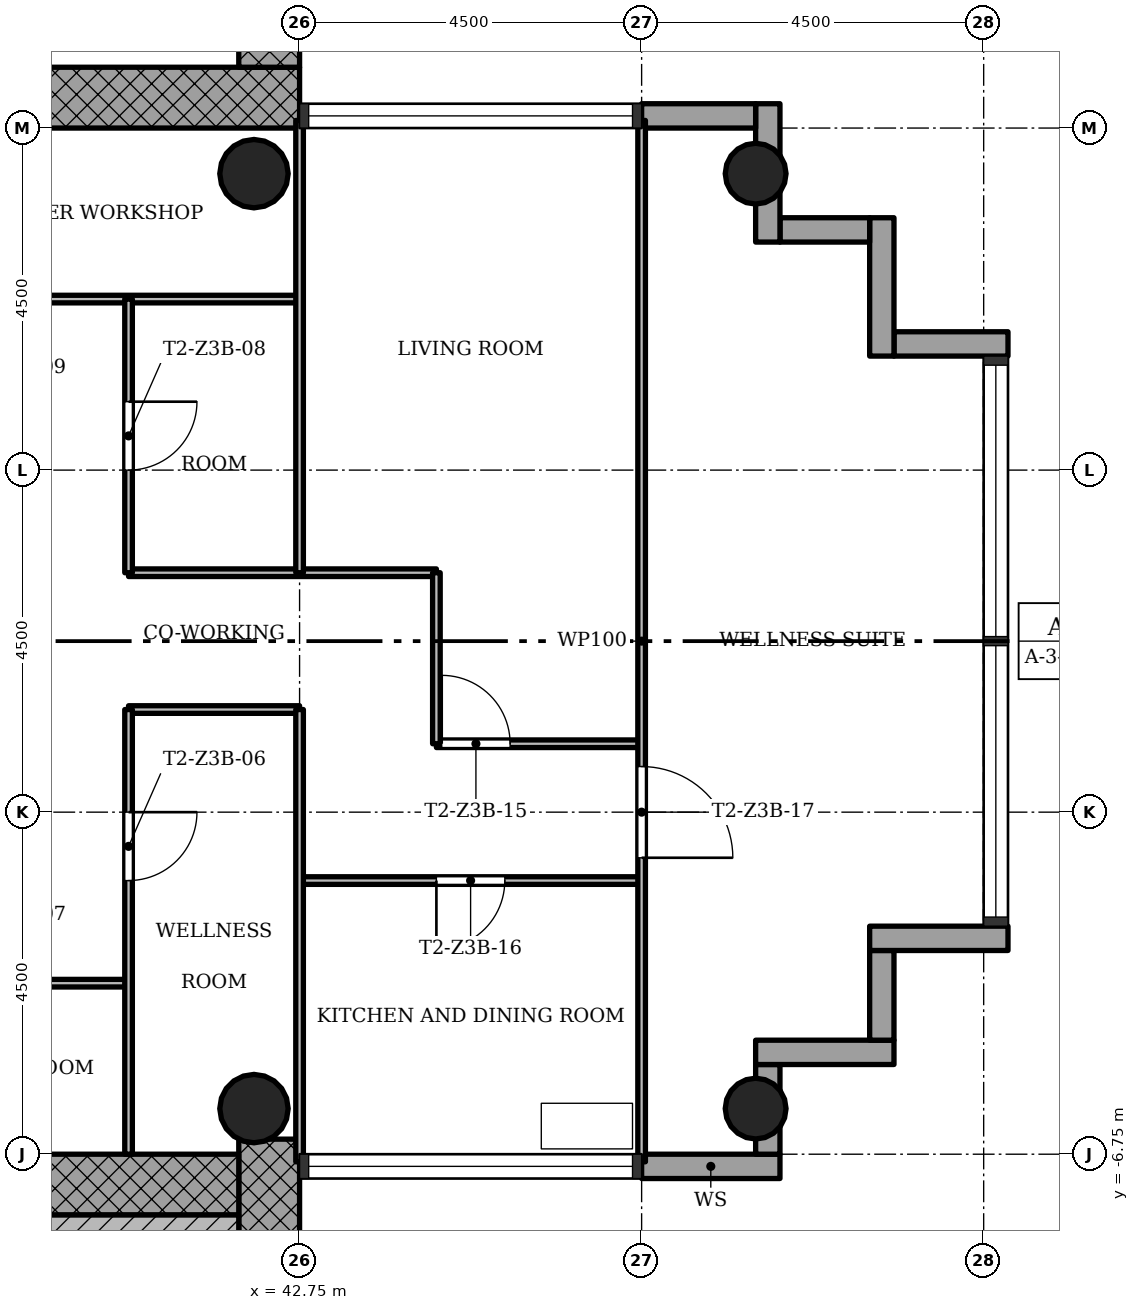
"""IFC4 building model, lengths in metres.
Left out: names, types, materials, properties, quantities, classifications, styles, units other than length and angle.
Written with IfcOpenShell. Run it as: python <this file> out.ifc"""

import sys

from ifc_helpers import new_model, si_unit, direction, frame, frame_2d, origin, origin_2d, place, context, subcontext, project, spatial, rectangle, hollow_circle, extrude, element, fill, save


model = new_model("IFC4")
c1 = context("Model", 3, precision=1e-05, world=origin(), true_north=direction((0.0, 1.0)))
c2 = subcontext(c1, "Body", "Model", "MODEL_VIEW")
j1 = project(units=[si_unit("LENGTHUNIT", "METRE"), si_unit("PLANEANGLEUNIT", "RADIAN")], contexts=[c1])
p1 = place(None, origin())
s1 = spatial("IfcSite", under=j1, at=p1, CompositionType="ELEMENT")
p2 = place(p1, origin())
s2 = spatial("IfcBuilding", under=s1, at=p2, CompositionType="ELEMENT")
p3 = place(p2, frame((0.0, 0.0, 147.3)))
s3 = spatial("IfcBuildingStorey", under=s2, at=p3, CompositionType="ELEMENT", Elevation=147.3)
p4 = place(p3, frame((30.05, 7.15, 0.0), z_axis=(0.0, 0.0, 1.0), x_axis=(1.0, 0.0, 0.0)))
e1 = element("IfcWall", 1, at=p4, inside=s3, PredefinedType="SHEAR", context=c2, shape_type="SweptSolid", body=[
    extrude(rectangle(XDim=12.7, YDim=0.8, at=frame_2d((6.35, 0.0))), origin(), (0.0, 0.0, 1.0), 3.4),
])
p5 = place(p4, frame((5.05, 0.0, 0.0)))
e2 = element("IfcOpeningElement", 2, at=p5, cuts=e1, PredefinedType="OPENING", context=c2, shape_type="SweptSolid", body=[
    extrude(rectangle(XDim=1.8, YDim=2.1, at=frame_2d((0.9, 1.05))), frame((0.0, 0.41, 0.0), z_axis=(0.0, -1.0, 0.0), x_axis=(1.0, 0.0, 0.0)), (0.0, 0.0, 1.0), 0.82),
])
p6 = place(p3, frame((42.35, 7.55, 0.0), z_axis=(0.0, 0.0, 1.0), x_axis=(0.0, 1.0, 0.0)))
e3 = element("IfcWall", 3, at=p6, inside=s3, PredefinedType="SHEAR", context=c2, shape_type="SweptSolid", body=[
    extrude(rectangle(XDim=8.2, YDim=0.8, at=frame_2d((4.1, 0.0))), origin(), (0.0, 0.0, 1.0), 3.4),
])
p7 = place(p3, frame((42.35, -14.95, 0.0), z_axis=(0.0, 0.0, 1.0), x_axis=(0.0, 1.0, 0.0)))
e4 = element("IfcWall", 4, at=p7, inside=s3, PredefinedType="SHEAR", context=c2, shape_type="SweptSolid", body=[
    extrude(rectangle(XDim=8.398, YDim=0.8, at=frame_2d((4.199, 0.0))), origin(), (0.0, 0.0, 1.0), 3.4),
])
p8 = place(p3, frame((41.95, -7.15, 0.0), z_axis=(0.0, 0.0, 1.0), x_axis=(-1.0, 0.0, 0.0)))
e5 = element("IfcWall", 5, at=p8, inside=s3, PredefinedType="SHEAR", context=c2, shape_type="SweptSolid", body=[
    extrude(rectangle(XDim=12.7, YDim=0.8, at=frame_2d((6.35, 0.0))), origin(), (0.0, 0.0, 1.0), 3.4),
])
p9 = place(p8, frame((5.05, 0.0, 0.0)))
e6 = element("IfcOpeningElement", 6, at=p9, cuts=e5, PredefinedType="OPENING", context=c2, shape_type="SweptSolid", body=[
    extrude(rectangle(XDim=1.8, YDim=2.1, at=frame_2d((0.9, 1.05))), frame((0.0, 0.41, 0.0), z_axis=(0.0, -1.0, 0.0), x_axis=(1.0, 0.0, 0.0)), (0.0, 0.0, 1.0), 0.82),
])
for number, where, z_axis, x_axis in (
    (7, (48.75, -6.15, 0.0), (0.0, 0.0, 1.0), (1.0, 0.0, 0.0)),
    (8, (48.75, 6.15, 0.0), (0.0, 0.0, 1.0), (1.0, 0.0, 0.0)),
):
    element("IfcColumn", number, at=place(p3, frame(where, z_axis=z_axis, x_axis=x_axis)), inside=s3, PredefinedType="COLUMN", context=c2, shape_type="SweptSolid", body=[
        extrude(hollow_circle(Radius=0.4, WallThickness=0.028, at=origin_2d()), origin(), (0.0, 0.0, 1.0), 3.4),
    ])
for number, where, z_axis, x_axis in (
    (9, (42.15, -6.15, 0.0), (0.0, 0.0, 1.0), (1.0, 0.0, 0.0)),
    (10, (42.15, 6.15, 0.0), (0.0, 0.0, 1.0), (1.0, 0.0, 0.0)),
):
    element("IfcColumn", number, at=place(p3, frame(where, z_axis=z_axis, x_axis=x_axis)), inside=s3, PredefinedType="COLUMN", context=c2, shape_type="SweptSolid", body=[
        extrude(hollow_circle(Radius=0.45, WallThickness=0.032, at=origin_2d()), origin(), (0.0, 0.0, 1.0), 3.4),
    ])
p10 = place(p3, frame((47.25, -6.91, -0.3), z_axis=(0.0, 0.0, 1.0), x_axis=(1.0, 0.0, 0.0)))
e11 = element("IfcWall", 11, at=p10, inside=s3, PredefinedType="STANDARD", context=c2, shape_type="SweptSolid", body=[
    extrude(rectangle(XDim=1.82, YDim=0.32, at=frame_2d((0.91, 0.0))), origin(), (0.0, 0.0, 1.0), 3.4),
])
p11 = place(p3, frame((48.91, -6.75, -0.3), z_axis=(0.0, 0.0, 1.0), x_axis=(0.0, 1.0, 0.0)))
e12 = element("IfcWall", 12, at=p11, inside=s3, PredefinedType="STANDARD", context=c2, shape_type="SweptSolid", body=[
    extrude(rectangle(XDim=1.18, YDim=0.32, at=frame_2d((0.59, 0.0))), origin(), (0.0, 0.0, 1.0), 3.4),
])
p12 = place(p3, frame((48.75, -5.41, -0.3), z_axis=(0.0, 0.0, 1.0), x_axis=(1.0, 0.0, 0.0)))
e13 = element("IfcWall", 13, at=p12, inside=s3, PredefinedType="STANDARD", context=c2, shape_type="SweptSolid", body=[
    extrude(rectangle(XDim=1.82, YDim=0.32, at=frame_2d((0.91, 0.0))), origin(), (0.0, 0.0, 1.0), 3.4),
])
p13 = place(p3, frame((50.41, -5.25, -0.3), z_axis=(0.0, 0.0, 1.0), x_axis=(0.0, 1.0, 0.0)))
e14 = element("IfcWall", 14, at=p13, inside=s3, PredefinedType="STANDARD", context=c2, shape_type="SweptSolid", body=[
    extrude(rectangle(XDim=1.18, YDim=0.32, at=frame_2d((0.59, 0.0))), origin(), (0.0, 0.0, 1.0), 3.4),
])
p14 = place(p3, frame((50.25, -3.91, -0.3), z_axis=(0.0, 0.0, 1.0), x_axis=(1.0, 0.0, 0.0)))
e15 = element("IfcWall", 15, at=p14, inside=s3, PredefinedType="STANDARD", context=c2, shape_type="SweptSolid", body=[
    extrude(rectangle(XDim=1.82, YDim=0.32, at=frame_2d((0.91, 0.0))), origin(), (0.0, 0.0, 1.0), 3.4),
])
p15 = place(p3, frame((52.07, 3.91, -0.3), z_axis=(0.0, 0.0, 1.0), x_axis=(-1.0, 0.0, 0.0)))
e16 = element("IfcWall", 16, at=p15, inside=s3, PredefinedType="STANDARD", context=c2, shape_type="SweptSolid", body=[
    extrude(rectangle(XDim=1.5, YDim=0.32, at=frame_2d((0.75, 0.0))), origin(), (0.0, 0.0, 1.0), 3.4),
])
p16 = place(p3, frame((50.41, 3.75, -0.3), z_axis=(0.0, 0.0, 1.0), x_axis=(0.0, 1.0, 0.0)))
e17 = element("IfcWall", 17, at=p16, inside=s3, PredefinedType="STANDARD", context=c2, shape_type="SweptSolid", body=[
    extrude(rectangle(XDim=1.82, YDim=0.32, at=frame_2d((0.91, 0.0))), origin(), (0.0, 0.0, 1.0), 3.4),
])
p17 = place(p3, frame((50.25, 5.41, -0.3), z_axis=(0.0, 0.0, 1.0), x_axis=(-1.0, 0.0, 0.0)))
e18 = element("IfcWall", 18, at=p17, inside=s3, PredefinedType="STANDARD", context=c2, shape_type="SweptSolid", body=[
    extrude(rectangle(XDim=1.18, YDim=0.32, at=frame_2d((0.59, 0.0))), origin(), (0.0, 0.0, 1.0), 3.4),
])
p18 = place(p3, frame((48.91, 5.25, -0.3), z_axis=(0.0, 0.0, 1.0), x_axis=(0.0, 1.0, 0.0)))
e19 = element("IfcWall", 19, at=p18, inside=s3, PredefinedType="STANDARD", context=c2, shape_type="SweptSolid", body=[
    extrude(rectangle(XDim=1.82, YDim=0.32, at=frame_2d((0.91, 0.0))), origin(), (0.0, 0.0, 1.0), 3.4),
])
p19 = place(p3, frame((48.75, 6.91, -0.3), z_axis=(0.0, 0.0, 1.0), x_axis=(-1.0, 0.0, 0.0)))
e20 = element("IfcWall", 20, at=p19, inside=s3, PredefinedType="STANDARD", context=c2, shape_type="SweptSolid", body=[
    extrude(rectangle(XDim=1.5, YDim=0.32, at=frame_2d((0.75, 0.0))), origin(), (0.0, 0.0, 1.0), 3.4),
])
p20 = place(p3, frame((40.5, -4.5, 0.0), z_axis=(0.0, 0.0, 1.0), x_axis=(-1.0, 0.0, 0.0)))
e21 = element("IfcWall", 21, at=p20, inside=s3, PredefinedType="PARTITIONING", context=c2, shape_type="SweptSolid", body=[
    extrude(rectangle(XDim=3.0, YDim=0.1, at=frame_2d((1.5, 0.0))), origin(), (0.0, 0.0, 1.0), 3.0),
])
p21 = place(p20, frame((1.05, 0.0, 0.0)))
e22 = element("IfcOpeningElement", 22, at=p21, cuts=e21, PredefinedType="OPENING", context=c2, shape_type="SweptSolid", body=[
    extrude(rectangle(XDim=0.9, YDim=2.1, at=frame_2d((0.45, 1.05))), frame((0.0, 0.06, 0.0), z_axis=(0.0, -1.0, 0.0), x_axis=(1.0, 0.0, 0.0)), (0.0, 0.0, 1.0), 0.12),
])
p22 = place(p3, frame((47.25, -3.15, 0.0), z_axis=(0.0, 0.0, 1.0), x_axis=(-1.0, 0.0, 0.0)))
e23 = element("IfcWall", 23, at=p22, inside=s3, PredefinedType="PARTITIONING", context=c2, shape_type="SweptSolid", body=[
    extrude(rectangle(XDim=4.5, YDim=0.1, at=frame_2d((2.25, 0.0))), origin(), (0.0, 0.0, 1.0), 3.0),
])
p23 = place(p22, frame((1.8, 0.0, 0.0)))
e24 = element("IfcOpeningElement", 24, at=p23, cuts=e23, PredefinedType="OPENING", context=c2, shape_type="SweptSolid", body=[
    extrude(rectangle(XDim=0.9, YDim=2.1, at=frame_2d((0.45, 1.05))), frame((0.0, 0.06, 0.0), z_axis=(0.0, -1.0, 0.0), x_axis=(1.0, 0.0, 0.0)), (0.0, 0.0, 1.0), 0.12),
])
p24 = place(p3, frame((47.25, -1.35, 0.0), z_axis=(0.0, 0.0, 1.0), x_axis=(-1.0, 0.0, 0.0)))
e25 = element("IfcWall", 25, at=p24, inside=s3, PredefinedType="PARTITIONING", context=c2, shape_type="SweptSolid", body=[
    extrude(rectangle(XDim=2.7, YDim=0.1, at=frame_2d((1.35, 0.0))), origin(), (0.0, 0.0, 1.0), 3.0),
])
p25 = place(p24, frame((1.73, 0.0, 0.0)))
e26 = element("IfcOpeningElement", 26, at=p25, cuts=e25, PredefinedType="OPENING", context=c2, shape_type="SweptSolid", body=[
    extrude(rectangle(XDim=0.9, YDim=2.1, at=frame_2d((0.45, 1.05))), frame((0.0, 0.06, 0.0), z_axis=(0.0, -1.0, 0.0), x_axis=(1.0, 0.0, 0.0)), (0.0, 0.0, 1.0), 0.12),
])
p26 = place(p3, frame((42.75, -0.9, 0.0), z_axis=(0.0, 0.0, 1.0), x_axis=(-1.0, 0.0, 0.0)))
e27 = element("IfcWall", 27, at=p26, inside=s3, PredefinedType="PARTITIONING", context=c2, shape_type="SweptSolid", body=[
    extrude(rectangle(XDim=2.25, YDim=0.1, at=frame_2d((1.125, 0.0))), origin(), (0.0, 0.0, 1.0), 3.0),
])
p27 = place(p3, frame((44.55, 0.9, 0.0), z_axis=(0.0, 0.0, 1.0), x_axis=(-1.0, 0.0, 0.0)))
e28 = element("IfcWall", 28, at=p27, inside=s3, PredefinedType="PARTITIONING", context=c2, shape_type="SweptSolid", body=[
    extrude(rectangle(XDim=4.05, YDim=0.1, at=frame_2d((2.025, 0.0))), origin(), (0.0, 0.0, 1.0), 3.0),
])
p28 = place(p3, frame((42.75, 4.5, 0.0), z_axis=(0.0, 0.0, 1.0), x_axis=(-1.0, 0.0, 0.0)))
e29 = element("IfcWall", 29, at=p28, inside=s3, PredefinedType="PARTITIONING", context=c2, shape_type="SweptSolid", body=[
    extrude(rectangle(XDim=5.25, YDim=0.1, at=frame_2d((2.625, 0.0))), origin(), (0.0, 0.0, 1.0), 3.0),
])
p29 = place(p28, frame((3.3, 0.0, 0.0)))
e30 = element("IfcOpeningElement", 30, at=p29, cuts=e29, PredefinedType="OPENING", context=c2, shape_type="SweptSolid", body=[
    extrude(rectangle(XDim=0.9, YDim=2.1, at=frame_2d((0.45, 1.05))), frame((0.0, 0.06, 0.0), z_axis=(0.0, -1.0, 0.0), x_axis=(1.0, 0.0, 0.0)), (0.0, 0.0, 1.0), 0.12),
])
p30 = place(p3, frame((47.25, -6.85, 0.0), z_axis=(0.0, 0.0, 1.0), x_axis=(0.0, 1.0, 0.0)))
e31 = element("IfcWall", 31, at=p30, inside=s3, PredefinedType="PARTITIONING", context=c2, shape_type="SweptSolid", body=[
    extrude(rectangle(XDim=13.7, YDim=0.1, at=frame_2d((6.85, 0.0))), origin(), (0.0, 0.0, 1.0), 3.0),
])
p31 = place(p30, frame((4.0, 0.0, 0.0)))
e32 = element("IfcOpeningElement", 32, at=p31, cuts=e31, PredefinedType="OPENING", context=c2, shape_type="SweptSolid", body=[
    extrude(rectangle(XDim=1.2, YDim=2.1, at=frame_2d((0.6, 1.05))), frame((0.0, 0.06, 0.0), z_axis=(0.0, -1.0, 0.0), x_axis=(1.0, 0.0, 0.0)), (0.0, 0.0, 1.0), 0.12),
])
p32 = place(p3, frame((44.55, -1.35, 0.0), z_axis=(0.0, 0.0, 1.0), x_axis=(0.0, 1.0, 0.0)))
e33 = element("IfcWall", 33, at=p32, inside=s3, PredefinedType="PARTITIONING", context=c2, shape_type="SweptSolid", body=[
    extrude(rectangle(XDim=2.25, YDim=0.1, at=frame_2d((1.125, 0.0))), origin(), (0.0, 0.0, 1.0), 3.0),
])
for number, where, z_axis, x_axis in (
    (34, (42.75, -6.85, 0.0), (0.0, 0.0, 1.0), (0.0, 1.0, 0.0)),
    (35, (42.75, 0.9, 0.0), (0.0, 0.0, 1.0), (0.0, 1.0, 0.0)),
):
    element("IfcWall", number, at=place(p3, frame(where, z_axis=z_axis, x_axis=x_axis)), inside=s3, PredefinedType="PARTITIONING", context=c2, shape_type="SweptSolid", body=[
        extrude(rectangle(XDim=5.95, YDim=0.1, at=frame_2d((2.975, 0.0))), origin(), (0.0, 0.0, 1.0), 3.0),
    ])
p33 = place(p3, frame((40.5, -6.75, 0.0), z_axis=(0.0, 0.0, 1.0), x_axis=(0.0, 1.0, 0.0)))
e36 = element("IfcWall", 36, at=p33, inside=s3, PredefinedType="PARTITIONING", context=c2, shape_type="SweptSolid", body=[
    extrude(rectangle(XDim=5.85, YDim=0.1, at=frame_2d((2.925, 0.0))), origin(), (0.0, 0.0, 1.0), 3.0),
])
p34 = place(p33, frame((3.6, 0.0, 0.0)))
e37 = element("IfcOpeningElement", 37, at=p34, cuts=e36, PredefinedType="OPENING", context=c2, shape_type="SweptSolid", body=[
    extrude(rectangle(XDim=0.9, YDim=2.1, at=frame_2d((0.45, 1.05))), frame((0.0, 0.06, 0.0), z_axis=(0.0, -1.0, 0.0), x_axis=(1.0, 0.0, 0.0)), (0.0, 0.0, 1.0), 0.12),
])
p35 = place(p3, frame((40.5, 0.9, 0.0), z_axis=(0.0, 0.0, 1.0), x_axis=(0.0, 1.0, 0.0)))
e38 = element("IfcWall", 38, at=p35, inside=s3, PredefinedType="PARTITIONING", context=c2, shape_type="SweptSolid", body=[
    extrude(rectangle(XDim=3.6, YDim=0.1, at=frame_2d((1.8, 0.0))), origin(), (0.0, 0.0, 1.0), 3.0),
])
p36 = place(p35, frame((1.35, 0.0, 0.0)))
e39 = element("IfcOpeningElement", 39, at=p36, cuts=e38, PredefinedType="OPENING", context=c2, shape_type="SweptSolid", body=[
    extrude(rectangle(XDim=0.9, YDim=2.1, at=frame_2d((0.45, 1.05))), frame((0.0, 0.06, 0.0), z_axis=(0.0, -1.0, 0.0), x_axis=(1.0, 0.0, 0.0)), (0.0, 0.0, 1.0), 0.12),
])
p37 = place(p3, frame((37.85, -7.75, 0.0), z_axis=(0.0, 0.0, 1.0), x_axis=(1.0, 0.0, 0.0)))
e40 = element("IfcWall", 40, at=p37, inside=s3, PredefinedType="SHEAR", context=c2, shape_type="SweptSolid", body=[
    extrude(rectangle(XDim=4.1, YDim=0.4, at=frame_2d((2.05, 0.0))), origin(), (0.0, 0.0, 1.0), 3.4),
])
p38 = place(p34, origin())
e41 = element("IfcDoor", 41, at=p38, inside=s3, OperationType="SINGLE_SWING_RIGHT", PredefinedType="DOOR", context=c2, shape_type="SweptSolid", body=[
    extrude(rectangle(XDim=0.9, YDim=2.1, at=frame_2d((0.45, 1.05))), frame((0.0, 0.025, 0.0), z_axis=(0.0, -1.0, 0.0), x_axis=(1.0, 0.0, 0.0)), (0.0, 0.0, 1.0), 0.05),
])
fill(e37, e41)
p39 = place(p36, origin())
e42 = element("IfcDoor", 42, at=p39, inside=s3, OperationType="SINGLE_SWING_RIGHT", PredefinedType="DOOR", context=c2, shape_type="SweptSolid", body=[
    extrude(rectangle(XDim=0.9, YDim=2.1, at=frame_2d((0.45, 1.05))), frame((0.0, 0.025, 0.0), z_axis=(0.0, -1.0, 0.0), x_axis=(1.0, 0.0, 0.0)), (0.0, 0.0, 1.0), 0.05),
])
fill(e39, e42)
p40 = place(p25, origin())
e43 = element("IfcDoor", 43, at=p40, inside=s3, OperationType="SINGLE_SWING_RIGHT", PredefinedType="DOOR", context=c2, shape_type="SweptSolid", body=[
    extrude(rectangle(XDim=0.9, YDim=2.1, at=frame_2d((0.45, 1.05))), frame((0.0, 0.025, 0.0), z_axis=(0.0, -1.0, 0.0), x_axis=(1.0, 0.0, 0.0)), (0.0, 0.0, 1.0), 0.05),
])
fill(e26, e43)
p41 = place(p23, origin())
e44 = element("IfcDoor", 44, at=p41, inside=s3, OperationType="SINGLE_SWING_LEFT", PredefinedType="DOOR", context=c2, shape_type="SweptSolid", body=[
    extrude(rectangle(XDim=0.9, YDim=2.1, at=frame_2d((0.45, 1.05))), frame((0.0, 0.025, 0.0), z_axis=(0.0, -1.0, 0.0), x_axis=(1.0, 0.0, 0.0)), (0.0, 0.0, 1.0), 0.05),
])
fill(e24, e44)
p42 = place(p31, origin())
e45 = element("IfcDoor", 45, at=p42, inside=s3, OperationType="SINGLE_SWING_LEFT", PredefinedType="DOOR", context=c2, shape_type="SweptSolid", body=[
    extrude(rectangle(XDim=1.2, YDim=2.1, at=frame_2d((0.6, 1.05))), frame((0.0, 0.025, 0.0), z_axis=(0.0, -1.0, 0.0), x_axis=(1.0, 0.0, 0.0)), (0.0, 0.0, 1.0), 0.05),
])
fill(e32, e45)
save(model, sys.argv[1])
